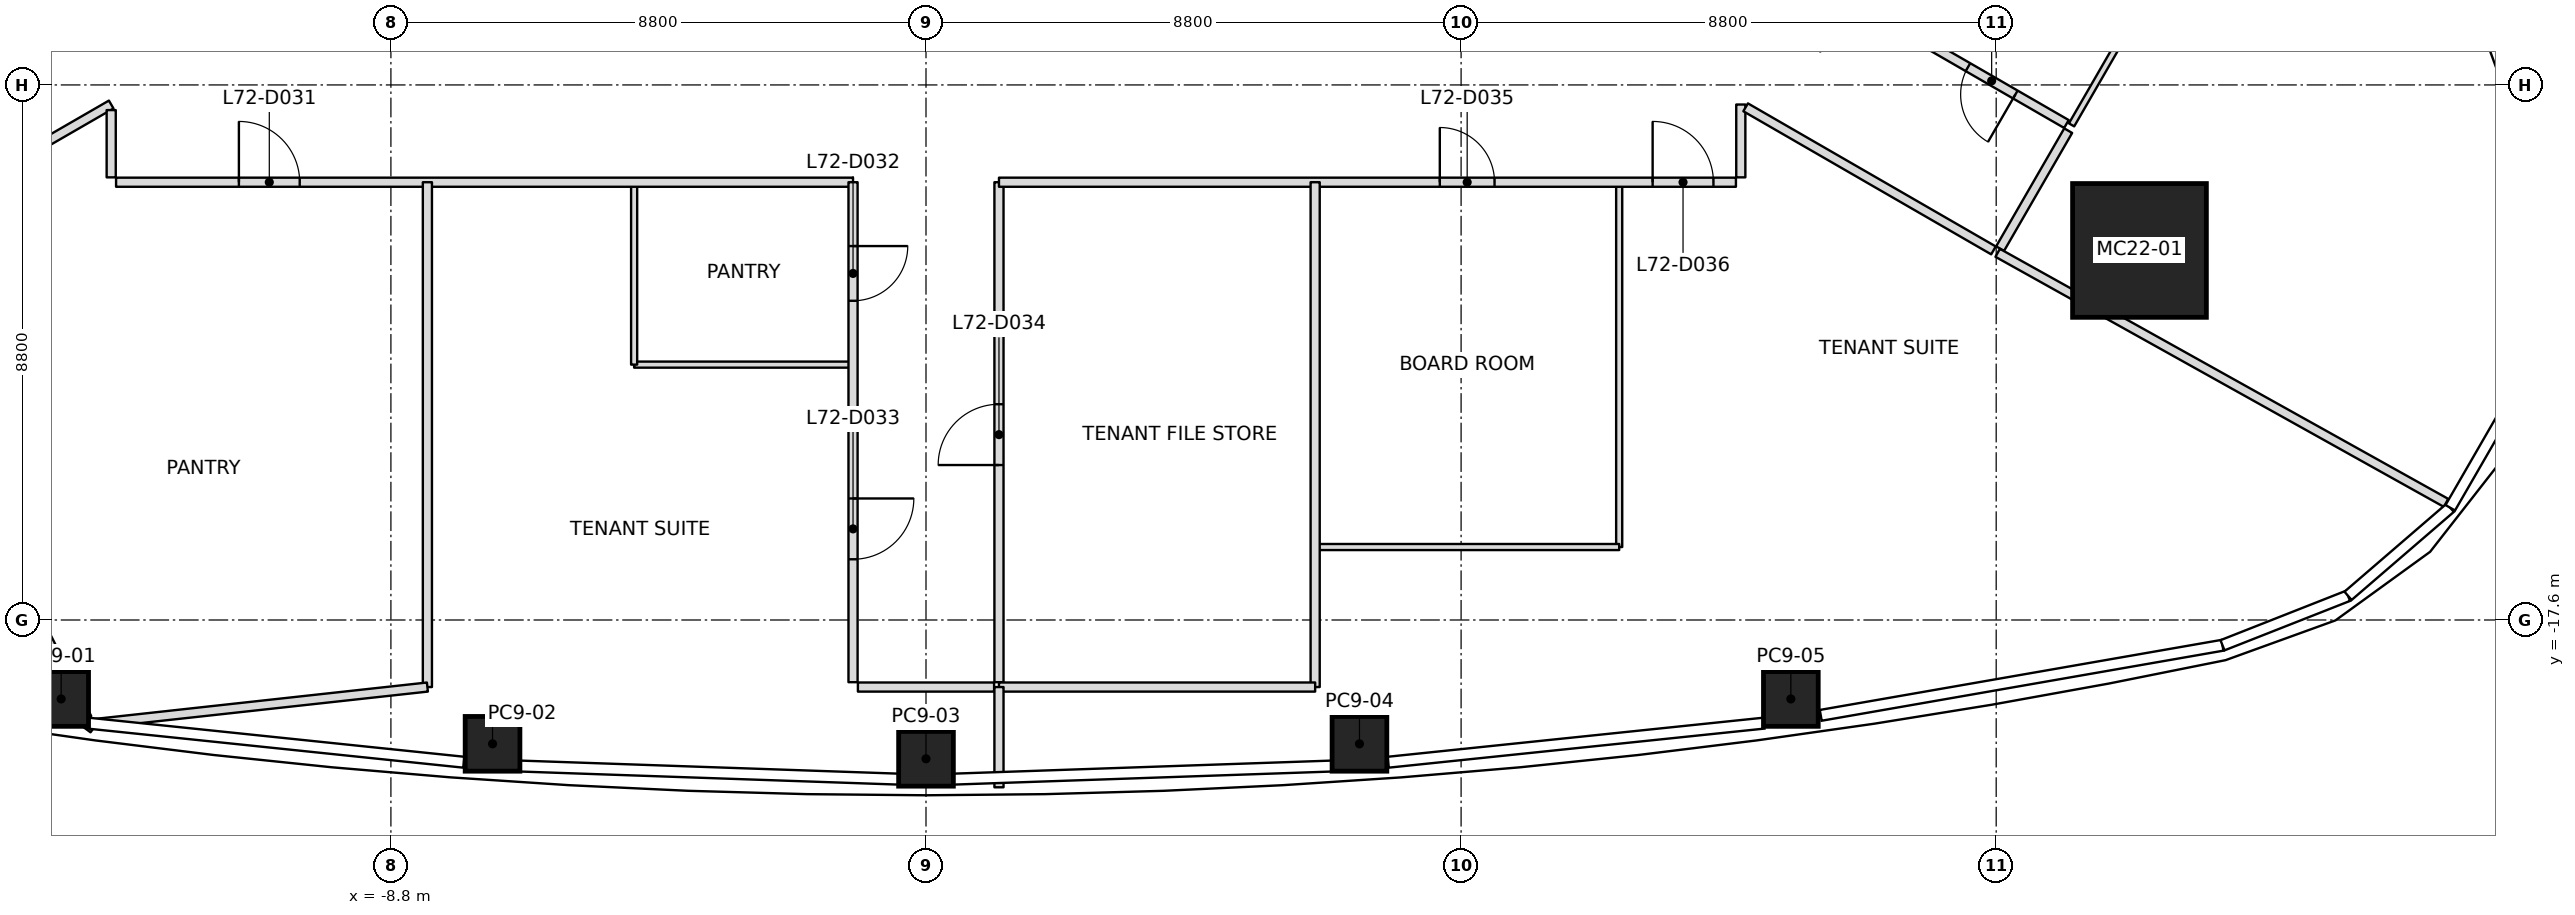
"""IFC4 building model, lengths in metres.
Left out: names, types, materials, properties, quantities, classifications, styles, units other than length and angle.
Written with IfcOpenShell. Run it as: python <this file> out.ifc"""

import sys

from ifc_helpers import new_model, si_unit, direction, frame, frame_2d, origin, origin_2d, place, context, subcontext, project, spatial, rectangle, extrude, clip, halfspace, element, fill, save


model = new_model("IFC4")
c1 = context("Model", 3, precision=1e-05, world=origin(), true_north=direction((0.0, 1.0)))
c2 = subcontext(c1, "Body", "Model", "MODEL_VIEW")
j1 = project(units=[si_unit("LENGTHUNIT", "METRE"), si_unit("PLANEANGLEUNIT", "RADIAN")], contexts=[c1])
p1 = place(None, origin())
s1 = spatial("IfcSite", under=j1, at=p1, CompositionType="ELEMENT")
p2 = place(p1, origin())
s2 = spatial("IfcBuilding", under=s1, at=p2, CompositionType="ELEMENT")
p3 = place(p2, frame((0.0, 0.0, 315.0)))
s3 = spatial("IfcBuildingStorey", under=s2, at=p3, CompositionType="ELEMENT", Elevation=315.0)
p4 = place(p3, frame((19.957, -11.522, 0.0), z_axis=(-0.027695790401, 0.015983033227, 0.999488612163), x_axis=(0.999616398022, 0.00044283261, 0.027692249912)))
e1 = element("IfcColumn", 1, at=p4, inside=s3, PredefinedType="COLUMN", context=c2, shape_type="SweptSolid", body=[
    clip(extrude(rectangle(XDim=2.2, YDim=2.2, at=origin_2d()), origin(), (0.0, 0.0, 1.0), 4.002), halfspace(frame((0.0, 0.0, 3.996)), False)),
])
p5 = place(p3, frame((-14.223, -18.899, 0.0), z_axis=(0.017391463473, 0.010312832726, 0.999795570344), x_axis=(-0.990322442734, 0.13788284729, 0.015804424743)))
e2 = element("IfcColumn", 2, at=p5, inside=s3, PredefinedType="COLUMN", context=c2, shape_type="SweptSolid", body=[
    clip(extrude(rectangle(XDim=0.9, YDim=0.9, at=origin_2d()), origin(), (0.0, 0.0, 1.0), 4.001), halfspace(frame((0.0, 0.0, 3.999)), False)),
])
p6 = place(p3, frame((-7.129, -19.637, 0.0), z_axis=(0.008727144629, 0.01122933295, 0.9998988644), x_axis=(-0.997577286368, 0.069113396853, 0.007930705989)))
e3 = element("IfcColumn", 3, at=p6, inside=s3, PredefinedType="COLUMN", context=c2, shape_type="SweptSolid", body=[
    clip(extrude(rectangle(XDim=0.9, YDim=0.9, at=origin_2d()), origin(), (0.0, 0.0, 1.0), 4.0), halfspace(frame((0.0, 0.0, 3.999)), False)),
])
p7 = place(p3, frame((0.0, -19.883, 0.0), z_axis=(0.0, 0.01141283087, 0.999934871525), x_axis=(1.0, 0.0, 0.0)))
e4 = element("IfcColumn", 4, at=p7, inside=s3, PredefinedType="COLUMN", context=c2, shape_type="SweptSolid", body=[
    clip(extrude(rectangle(XDim=0.9, YDim=0.9, at=origin_2d()), origin(), (0.0, 0.0, 1.0), 4.0), halfspace(frame((0.0, 0.0, 3.999)), False)),
])
p8 = place(p3, frame((7.129, -19.637, 0.0), z_axis=(-0.008727144629, 0.01122933295, 0.9998988644), x_axis=(0.997577286368, 0.069113396853, 0.007930705989)))
e5 = element("IfcColumn", 5, at=p8, inside=s3, PredefinedType="COLUMN", context=c2, shape_type="SweptSolid", body=[
    clip(extrude(rectangle(XDim=0.9, YDim=0.9, at=origin_2d()), origin(), (0.0, 0.0, 1.0), 4.0), halfspace(frame((0.0, 0.0, 3.999)), False)),
])
p9 = place(p3, frame((14.223, -18.899, 0.0), z_axis=(-0.017391463473, 0.010312832726, 0.999795570344), x_axis=(0.990322442734, 0.13788284729, 0.015804424743)))
e6 = element("IfcColumn", 6, at=p9, inside=s3, PredefinedType="COLUMN", context=c2, shape_type="SweptSolid", body=[
    clip(extrude(rectangle(XDim=0.9, YDim=0.9, at=origin_2d()), origin(), (0.0, 0.0, 1.0), 4.001), halfspace(frame((0.0, 0.0, 3.999)), False)),
])
p10 = place(p3, frame((-17.625, -11.561, 0.0), z_axis=(0.0, 0.0, 1.0), x_axis=(0.447464657965, -0.894301615716, 0.0)))
e7 = element("IfcWall", 7, at=p10, inside=s3, PredefinedType="PARTITIONING", context=c2, shape_type="SweptSolid", body=[
    extrude(rectangle(XDim=8.557, YDim=0.15, at=frame_2d((4.278, 0.0))), origin(), (0.0, 0.0, 1.0), 3.45),
])
p11 = place(p3, frame((-8.2, -10.4, 0.0), z_axis=(0.0, 0.0, 1.0), x_axis=(0.0, -1.0, 0.0)))
e8 = element("IfcWall", 8, at=p11, inside=s3, PredefinedType="PARTITIONING", context=c2, shape_type="SweptSolid", body=[
    extrude(rectangle(XDim=8.303, YDim=0.15, at=frame_2d((4.151, 0.0))), origin(), (0.0, 0.0, 1.0), 3.45),
])
p12 = place(p3, frame((-8.2, -18.703, 0.0), z_axis=(0.0, 0.0, 1.0), x_axis=(-0.994036039738, -0.109052059594, 0.0)))
e9 = element("IfcWall", 9, at=p12, inside=s3, PredefinedType="PARTITIONING", context=c2, shape_type="SweptSolid", body=[
    extrude(rectangle(XDim=5.478, YDim=0.15, at=frame_2d((2.739, 0.0))), origin(), (0.0, 0.0, 1.0), 3.234),
])
p13 = place(p3, frame((-13.696, -19.387, 0.0), z_axis=(0.0, 0.0, 1.0), x_axis=(-0.806193122495, 0.591652473368, 0.0)))
e10 = element("IfcWall", 10, at=p13, inside=s3, PredefinedType="PARTITIONING", context=c2, shape_type="SweptSolid", body=[
    extrude(rectangle(XDim=0.183, YDim=0.15, at=frame_2d((0.092, 0.0))), origin(), (0.0, 0.0, 1.0), 3.45),
])
p14 = place(p3, frame((6.4, -10.4, 0.0), z_axis=(0.0, 0.0, 1.0), x_axis=(0.0, -1.0, 0.0)))
e11 = element("IfcWall", 11, at=p14, inside=s3, PredefinedType="PARTITIONING", context=c2, shape_type="SweptSolid", body=[
    extrude(rectangle(XDim=8.303, YDim=0.15, at=frame_2d((4.151, 0.0))), origin(), (0.0, 0.0, 1.0), 3.45),
])
p15 = place(p3, frame((6.4, -18.703, 0.0), z_axis=(0.0, 0.0, 1.0), x_axis=(-1.0, 0.0, 0.0)))
e12 = element("IfcWall", 12, at=p15, inside=s3, PredefinedType="PARTITIONING", context=c2, shape_type="SweptSolid", body=[
    extrude(rectangle(XDim=5.2, YDim=0.15, at=frame_2d((2.6, 0.0))), origin(), (0.0, 0.0, 1.0), 3.393),
])
p16 = place(p3, frame((1.2, -18.703, 0.0), z_axis=(0.0, 0.0, 1.0), x_axis=(0.0, -1.0, 0.0)))
e13 = element("IfcWall", 13, at=p16, inside=s3, PredefinedType="PARTITIONING", context=c2, shape_type="SweptSolid", body=[
    extrude(rectangle(XDim=1.649, YDim=0.15, at=frame_2d((0.824, 0.0))), origin(), (0.0, 0.0, 1.0), 3.234),
])
p17 = place(p3, frame((17.625, -11.561, 0.0), z_axis=(0.0, 0.0, 1.0), x_axis=(0.873370497539, -0.487056438238, 0.0)))
e14 = element("IfcWall", 14, at=p17, inside=s3, PredefinedType="PARTITIONING", context=c2, shape_type="SweptSolid", body=[
    extrude(rectangle(XDim=8.443, YDim=0.15, at=frame_2d((4.222, 0.0))), origin(), (0.0, 0.0, 1.0), 3.234),
])
p18 = place(p3, frame((-13.4, -6.351, 0.0), z_axis=(0.0, 0.0, 1.0), x_axis=(-0.866038319186, -0.499977629202, 0.0)))
e15 = element("IfcWall", 15, at=p18, inside=s3, PredefinedType="PARTITIONING", context=c2, shape_type="SweptSolid", body=[
    extrude(rectangle(XDim=6.184, YDim=0.15, at=frame_2d((3.092, 0.0))), origin(), (0.0, 0.0, 1.0), 3.317),
])
p19 = place(p3, frame((-17.555, -11.521, 0.0), z_axis=(0.0, 0.0, 1.0), x_axis=(0.866027142779, 0.499996987961, 0.0)))
e16 = element("IfcWall", 16, at=p19, inside=s3, PredefinedType="PARTITIONING", context=c2, shape_type="SweptSolid", body=[
    extrude(rectangle(XDim=4.798, YDim=0.15, at=frame_2d((2.399, 0.0))), origin(), (0.0, 0.0, 1.0), 3.233),
])
p20 = place(p3, frame((-13.4, -9.214, 0.0), z_axis=(0.0, 0.0, 1.0), x_axis=(0.0, -1.0, 0.0)))
e17 = element("IfcWall", 17, at=p20, inside=s3, PredefinedType="PARTITIONING", context=c2, shape_type="SweptSolid", body=[
    extrude(rectangle(XDim=1.106, YDim=0.15, at=frame_2d((0.553, 0.0))), origin(), (0.0, 0.0, 1.0), 3.233),
])
p21 = place(p3, frame((-13.32, -10.4, 0.0), z_axis=(0.0, 0.0, 1.0), x_axis=(1.0, 0.0, 0.0)))
e18 = element("IfcWall", 18, at=p21, inside=s3, PredefinedType="PARTITIONING", context=c2, shape_type="SweptSolid", body=[
    extrude(rectangle(XDim=12.12, YDim=0.15, at=frame_2d((6.06, 0.0))), origin(), (0.0, 0.0, 1.0), 3.393),
])
p22 = place(p21, frame((2.02, 0.0, 0.0)))
e19 = element("IfcOpeningElement", 19, at=p22, cuts=e18, PredefinedType="OPENING", context=c2, shape_type="SweptSolid", body=[
    extrude(rectangle(XDim=1.0, YDim=2.1, at=frame_2d((0.5, 1.05))), frame((0.0, 0.075, 0.0), z_axis=(0.0, -1.0, 0.0), x_axis=(1.0, 0.0, 0.0)), (0.0, 0.0, 1.0), 0.15),
])
p23 = place(p3, frame((-1.2, -10.4, 0.0), z_axis=(0.0, 0.0, 1.0), x_axis=(0.0, -1.0, 0.0)))
e20 = element("IfcWall", 20, at=p23, inside=s3, PredefinedType="PARTITIONING", context=c2, shape_type="SweptSolid", body=[
    extrude(rectangle(XDim=8.223, YDim=0.15, at=frame_2d((4.111, 0.0))), origin(), (0.0, 0.0, 1.0), 3.45),
])
p24 = place(p23, frame((1.05, 0.0, 0.0)))
e21 = element("IfcOpeningElement", 21, at=p24, cuts=e20, PredefinedType="OPENING", context=c2, shape_type="SweptSolid", body=[
    extrude(rectangle(XDim=0.9, YDim=2.1, at=frame_2d((0.45, 1.05))), frame((0.0, 0.075, 0.0), z_axis=(0.0, -1.0, 0.0), x_axis=(1.0, 0.0, 0.0)), (0.0, 0.0, 1.0), 0.15),
])
p25 = place(p23, frame((5.201, 0.0, 0.0)))
e22 = element("IfcOpeningElement", 22, at=p25, cuts=e20, PredefinedType="OPENING", context=c2, shape_type="SweptSolid", body=[
    extrude(rectangle(XDim=1.0, YDim=2.1, at=frame_2d((0.5, 1.05))), frame((0.0, 0.075, 0.0), z_axis=(0.0, -1.0, 0.0), x_axis=(1.0, 0.0, 0.0)), (0.0, 0.0, 1.0), 0.15),
])
p26 = place(p3, frame((-1.12, -18.703, 0.0), z_axis=(0.0, 0.0, 1.0), x_axis=(1.0, 0.0, 0.0)))
e23 = element("IfcWall", 23, at=p26, inside=s3, PredefinedType="PARTITIONING", context=c2, shape_type="SweptSolid", body=[
    extrude(rectangle(XDim=2.24, YDim=0.15, at=frame_2d((1.12, 0.0))), origin(), (0.0, 0.0, 1.0), 3.45),
])
p27 = place(p3, frame((1.2, -18.623, 0.0), z_axis=(0.0, 0.0, 1.0), x_axis=(0.0, 1.0, 0.0)))
e24 = element("IfcWall", 24, at=p27, inside=s3, PredefinedType="PARTITIONING", context=c2, shape_type="SweptSolid", body=[
    extrude(rectangle(XDim=8.223, YDim=0.15, at=frame_2d((4.111, 0.0))), origin(), (0.0, 0.0, 1.0), 3.45),
])
p28 = place(p27, frame((3.572, 0.0, 0.0)))
e25 = element("IfcOpeningElement", 25, at=p28, cuts=e24, PredefinedType="OPENING", context=c2, shape_type="SweptSolid", body=[
    extrude(rectangle(XDim=1.0, YDim=2.1, at=frame_2d((0.5, 1.05))), frame((0.0, 0.075, 0.0), z_axis=(0.0, -1.0, 0.0), x_axis=(1.0, 0.0, 0.0)), (0.0, 0.0, 1.0), 0.15),
])
p29 = place(p3, frame((1.2, -10.4, 0.0), z_axis=(0.0, 0.0, 1.0), x_axis=(1.0, 0.0, 0.0)))
e26 = element("IfcWall", 26, at=p29, inside=s3, PredefinedType="PARTITIONING", context=c2, shape_type="SweptSolid", body=[
    extrude(rectangle(XDim=12.12, YDim=0.15, at=frame_2d((6.06, 0.0))), origin(), (0.0, 0.0, 1.0), 3.393),
])
p30 = place(p29, frame((7.25, 0.0, 0.0)))
e27 = element("IfcOpeningElement", 27, at=p30, cuts=e26, PredefinedType="OPENING", context=c2, shape_type="SweptSolid", body=[
    extrude(rectangle(XDim=0.9, YDim=2.1, at=frame_2d((0.45, 1.05))), frame((0.0, 0.075, 0.0), z_axis=(0.0, -1.0, 0.0), x_axis=(1.0, 0.0, 0.0)), (0.0, 0.0, 1.0), 0.15),
])
p31 = place(p29, frame((10.75, 0.0, 0.0)))
e28 = element("IfcOpeningElement", 28, at=p31, cuts=e26, PredefinedType="OPENING", context=c2, shape_type="SweptSolid", body=[
    extrude(rectangle(XDim=1.0, YDim=2.1, at=frame_2d((0.5, 1.05))), frame((0.0, 0.075, 0.0), z_axis=(0.0, -1.0, 0.0), x_axis=(1.0, 0.0, 0.0)), (0.0, 0.0, 1.0), 0.15),
])
p32 = place(p3, frame((13.4, -10.32, 0.0), z_axis=(0.0, 0.0, 1.0), x_axis=(0.0, 1.0, 0.0)))
e29 = element("IfcWall", 29, at=p32, inside=s3, PredefinedType="PARTITIONING", context=c2, shape_type="SweptSolid", body=[
    extrude(rectangle(XDim=1.198, YDim=0.15, at=frame_2d((0.599, 0.0))), origin(), (0.0, 0.0, 1.0), 3.233),
])
p33 = place(p3, frame((13.479, -9.168, 0.0), z_axis=(0.0, 0.0, 1.0), x_axis=(0.866035288455, -0.499982878858, 0.0)))
e30 = element("IfcWall", 30, at=p33, inside=s3, PredefinedType="PARTITIONING", context=c2, shape_type="SweptSolid", body=[
    extrude(rectangle(XDim=4.707, YDim=0.15, at=frame_2d((2.354, 0.0))), origin(), (0.0, 0.0, 1.0), 3.233),
])
p34 = place(p3, frame((18.755, -9.443, 0.0), z_axis=(0.0, 0.0, 1.0), x_axis=(-0.866038319186, 0.499977629202, 0.0)))
e31 = element("IfcWall", 31, at=p34, inside=s3, PredefinedType="PARTITIONING", context=c2, shape_type="SweptSolid", body=[
    extrude(rectangle(XDim=6.184, YDim=0.15, at=frame_2d((3.092, 0.0))), origin(), (0.0, 0.0, 1.0), 3.317),
])
p35 = place(p34, frame((0.97, 0.0, 0.0)))
e32 = element("IfcOpeningElement", 32, at=p35, cuts=e31, PredefinedType="OPENING", context=c2, shape_type="SweptSolid", body=[
    extrude(rectangle(XDim=0.9, YDim=2.1, at=frame_2d((0.45, 1.05))), frame((0.0, 0.075, 0.0), z_axis=(0.0, -1.0, 0.0), x_axis=(1.0, 0.0, 0.0)), (0.0, 0.0, 1.0), 0.15),
])
p36 = place(p34, frame((4.102, 0.0, 0.0)))
e33 = element("IfcOpeningElement", 33, at=p36, cuts=e31, PredefinedType="OPENING", context=c2, shape_type="SweptSolid", body=[
    extrude(rectangle(XDim=1.0, YDim=2.1, at=frame_2d((0.5, 1.05))), frame((0.0, 0.075, 0.0), z_axis=(0.0, -1.0, 0.0), x_axis=(1.0, 0.0, 0.0)), (0.0, 0.0, 1.0), 0.15),
])
p37 = place(p3, frame((17.665, -11.492, 0.0), z_axis=(0.0, 0.0, 1.0), x_axis=(0.49994888933, 0.866054910533, 0.0)))
e34 = element("IfcWall", 34, at=p37, inside=s3, PredefinedType="PARTITIONING", context=c2, shape_type="SweptSolid", body=[
    extrude(rectangle(XDim=2.24, YDim=0.15, at=frame_2d((1.12, 0.0))), origin(), (0.0, 0.0, 1.0), 3.233),
])
p38 = place(p3, frame((-1.23, -13.4, 0.0), z_axis=(0.0, 0.0, 1.0), x_axis=(-1.0, 0.0, 0.0)))
e35 = element("IfcWall", 35, at=p38, inside=s3, PredefinedType="PARTITIONING", context=c2, shape_type="SweptSolid", body=[
    extrude(rectangle(XDim=3.57, YDim=0.1, at=frame_2d((1.785, 0.0))), origin(), (0.0, 0.0, 1.0), 3.393),
])
p39 = place(p3, frame((-4.8, -13.4, 0.0), z_axis=(0.0, 0.0, 1.0), x_axis=(0.0, 1.0, 0.0)))
e36 = element("IfcWall", 36, at=p39, inside=s3, PredefinedType="PARTITIONING", context=c2, shape_type="SweptSolid", body=[
    extrude(rectangle(XDim=2.97, YDim=0.1, at=frame_2d((1.485, 0.0))), origin(), (0.0, 0.0, 1.0), 3.45),
])
p40 = place(p3, frame((11.4, -10.43, 0.0), z_axis=(0.0, 0.0, 1.0), x_axis=(0.0, -1.0, 0.0)))
e37 = element("IfcWall", 37, at=p40, inside=s3, PredefinedType="PARTITIONING", context=c2, shape_type="SweptSolid", body=[
    extrude(rectangle(XDim=5.97, YDim=0.1, at=frame_2d((2.985, 0.0))), origin(), (0.0, 0.0, 1.0), 3.45),
])
p41 = place(p3, frame((11.4, -16.4, 0.0), z_axis=(0.0, 0.0, 1.0), x_axis=(-1.0, 0.0, 0.0)))
e38 = element("IfcWall", 38, at=p41, inside=s3, PredefinedType="PARTITIONING", context=c2, shape_type="SweptSolid", body=[
    extrude(rectangle(XDim=4.97, YDim=0.1, at=frame_2d((2.485, 0.0))), origin(), (0.0, 0.0, 1.0), 3.393),
])
p42 = place(p3, frame((20.625, -6.365, 0.0), z_axis=(0.0, 0.0, 1.0), x_axis=(-0.499971082179, -0.866042098853, 0.0)))
e39 = element("IfcWall", 39, at=p42, inside=s3, PredefinedType="PARTITIONING", context=c2, shape_type="SweptSolid", body=[
    extrude(rectangle(XDim=3.57, YDim=0.1, at=frame_2d((1.785, 0.0))), origin(), (0.0, 0.0, 1.0), 3.45),
])
p43 = place(p22, origin())
e40 = element("IfcDoor", 40, at=p43, inside=s3, OperationType="SINGLE_SWING_LEFT", PredefinedType="DOOR", context=c2, shape_type="SweptSolid", body=[
    extrude(rectangle(XDim=1.0, YDim=2.1, at=frame_2d((0.5, 1.05))), frame((0.0, 0.025, 0.0), z_axis=(0.0, -1.0, 0.0), x_axis=(1.0, 0.0, 0.0)), (0.0, 0.0, 1.0), 0.05),
])
fill(e19, e40)
p44 = place(p24, origin())
e41 = element("IfcDoor", 41, at=p44, inside=s3, OperationType="SINGLE_SWING_RIGHT", PredefinedType="DOOR", context=c2, shape_type="SweptSolid", body=[
    extrude(rectangle(XDim=0.9, YDim=2.1, at=frame_2d((0.45, 1.05))), frame((0.0, 0.025, 0.0), z_axis=(0.0, -1.0, 0.0), x_axis=(1.0, 0.0, 0.0)), (0.0, 0.0, 1.0), 0.05),
])
fill(e21, e41)
p45 = place(p25, origin())
e42 = element("IfcDoor", 42, at=p45, inside=s3, OperationType="SINGLE_SWING_RIGHT", PredefinedType="DOOR", context=c2, shape_type="SweptSolid", body=[
    extrude(rectangle(XDim=1.0, YDim=2.1, at=frame_2d((0.5, 1.05))), frame((0.0, 0.025, 0.0), z_axis=(0.0, -1.0, 0.0), x_axis=(1.0, 0.0, 0.0)), (0.0, 0.0, 1.0), 0.05),
])
fill(e22, e42)
p46 = place(p28, origin())
e43 = element("IfcDoor", 43, at=p46, inside=s3, OperationType="SINGLE_SWING_RIGHT", PredefinedType="DOOR", context=c2, shape_type="SweptSolid", body=[
    extrude(rectangle(XDim=1.0, YDim=2.1, at=frame_2d((0.5, 1.05))), frame((0.0, 0.025, 0.0), z_axis=(0.0, -1.0, 0.0), x_axis=(1.0, 0.0, 0.0)), (0.0, 0.0, 1.0), 0.05),
])
fill(e25, e43)
p47 = place(p30, origin())
e44 = element("IfcDoor", 44, at=p47, inside=s3, OperationType="SINGLE_SWING_RIGHT", PredefinedType="DOOR", context=c2, shape_type="SweptSolid", body=[
    extrude(rectangle(XDim=0.9, YDim=2.1, at=frame_2d((0.45, 1.05))), frame((0.0, 0.025, 0.0), z_axis=(0.0, -1.0, 0.0), x_axis=(1.0, 0.0, 0.0)), (0.0, 0.0, 1.0), 0.05),
])
fill(e27, e44)
p48 = place(p31, origin())
e45 = element("IfcDoor", 45, at=p48, inside=s3, OperationType="SINGLE_SWING_RIGHT", PredefinedType="DOOR", context=c2, shape_type="SweptSolid", body=[
    extrude(rectangle(XDim=1.0, YDim=2.1, at=frame_2d((0.5, 1.05))), frame((0.0, 0.025, 0.0), z_axis=(0.0, -1.0, 0.0), x_axis=(1.0, 0.0, 0.0)), (0.0, 0.0, 1.0), 0.05),
])
fill(e28, e45)
p49 = place(p35, origin())
e46 = element("IfcDoor", 46, at=p49, inside=s3, OperationType="SINGLE_SWING_LEFT", PredefinedType="DOOR", context=c2, shape_type="SweptSolid", body=[
    extrude(rectangle(XDim=0.9, YDim=2.1, at=frame_2d((0.45, 1.05))), frame((0.0, 0.025, 0.0), z_axis=(0.0, -1.0, 0.0), x_axis=(1.0, 0.0, 0.0)), (0.0, 0.0, 1.0), 0.05),
])
fill(e32, e46)
save(model, sys.argv[1])
